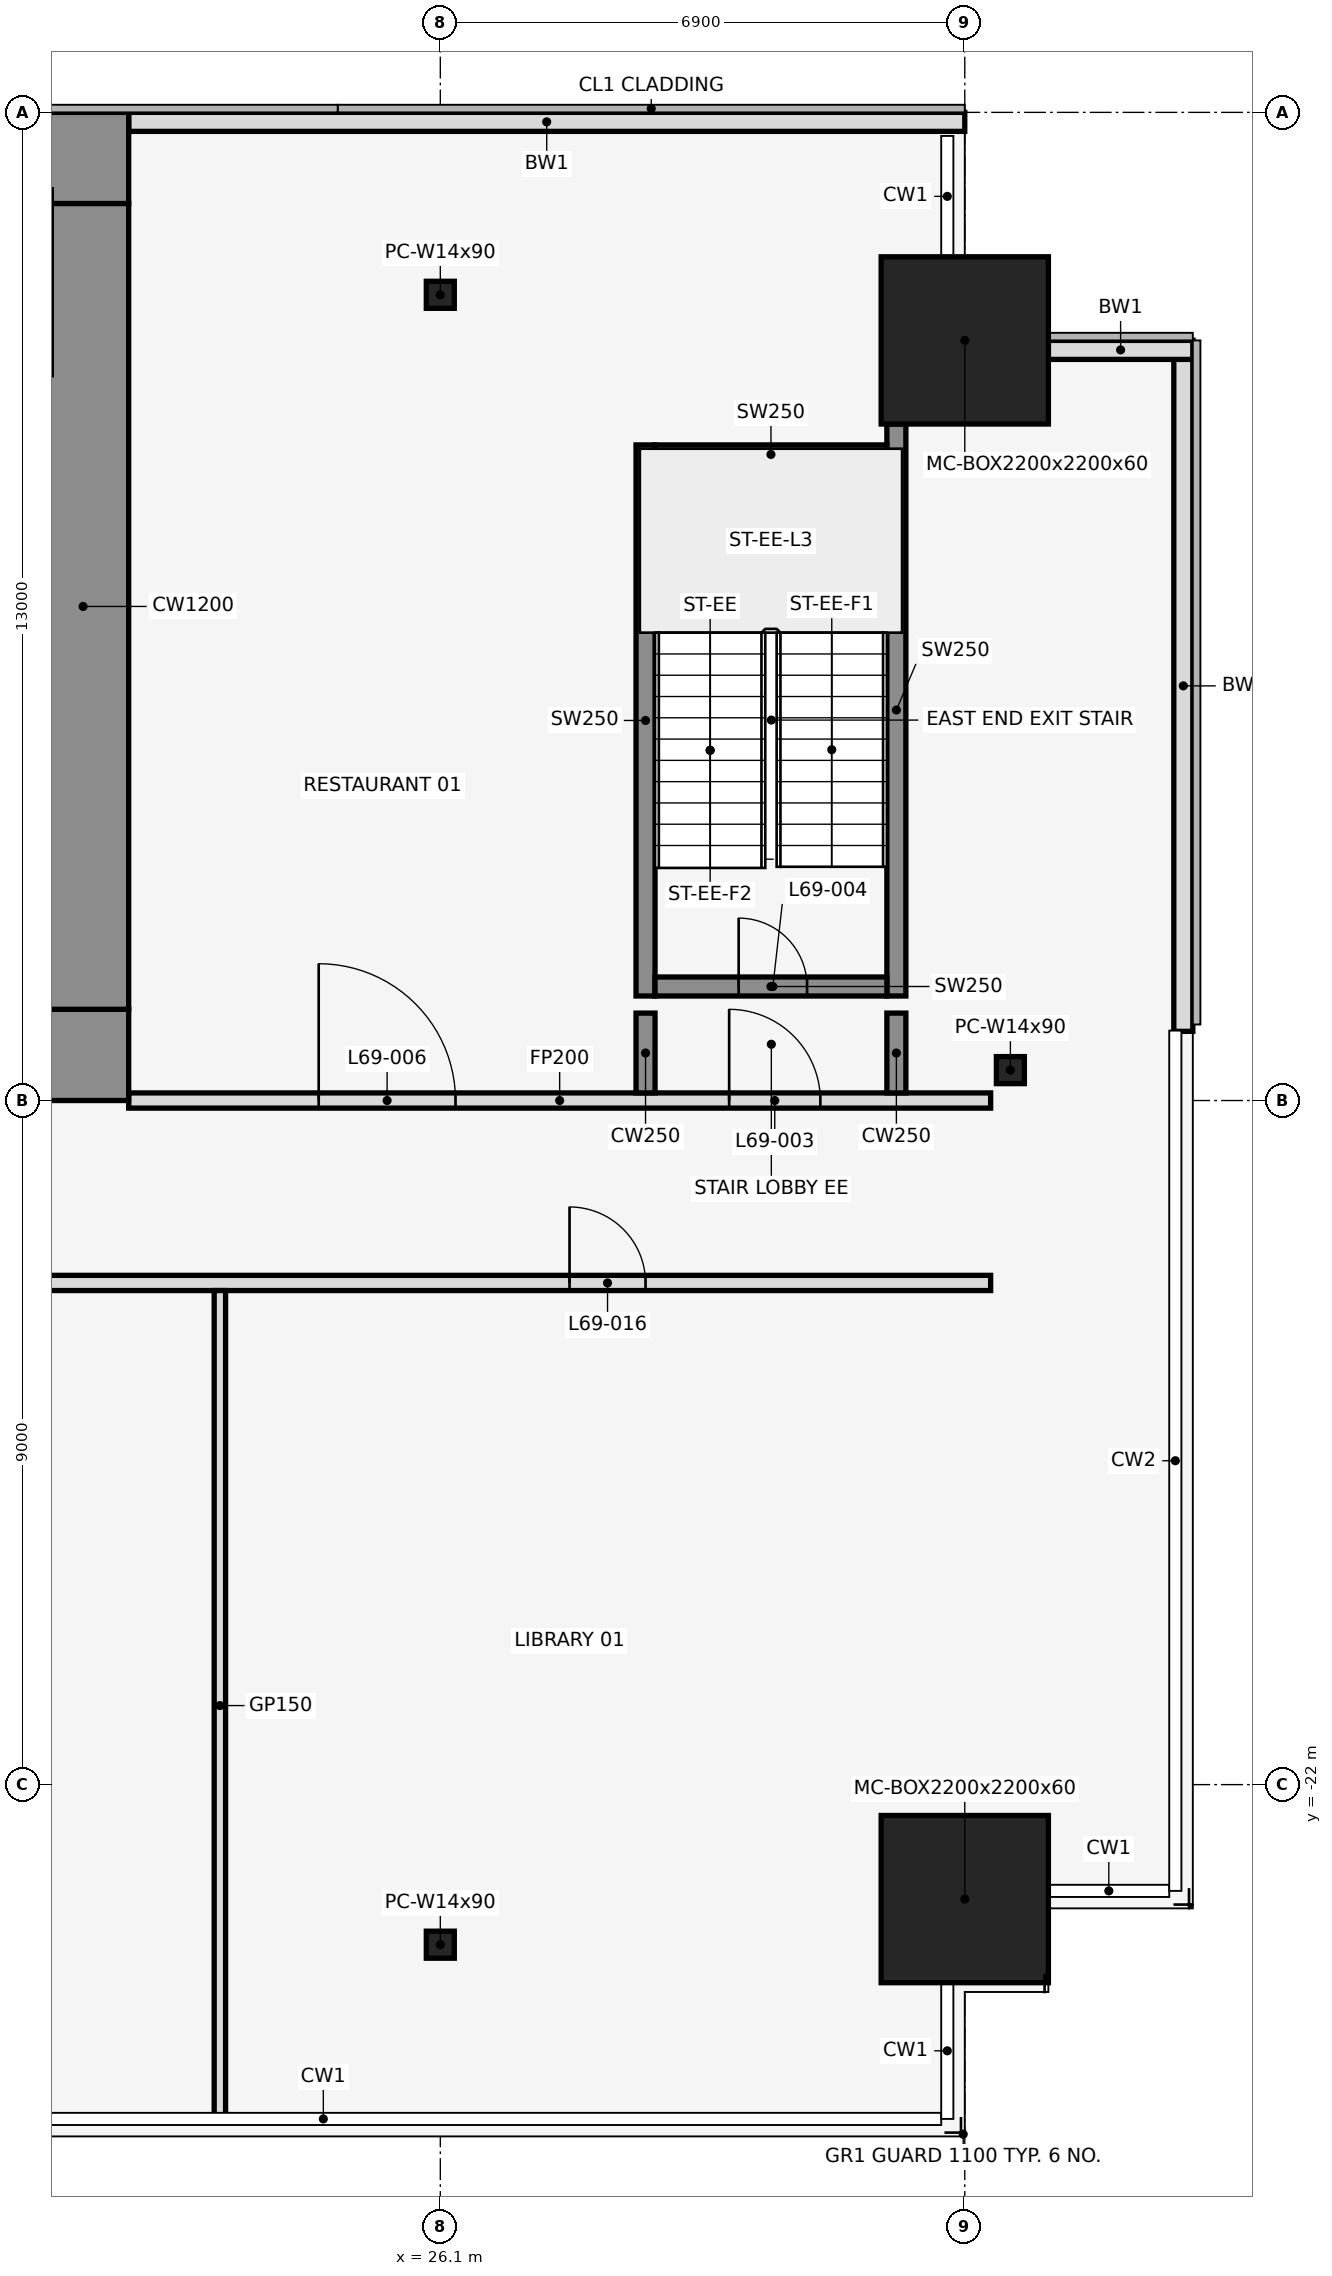
"""IFC4 building model, lengths in metres.
Left out: names, types, materials, properties, quantities, classifications, styles, units other than length and angle.
Written with IfcOpenShell. Run it as: python <this file> out.ifc"""

import sys

from ifc_helpers import new_model, si_unit, direction, frame, frame_2d, origin, origin_2d, place, context, subcontext, project, spatial, rectangle, hollow_rectangle, i_section, extrude, element, fill, save


model = new_model("IFC4")
c1 = context("Model", 3, precision=1e-05, world=origin(), true_north=direction((0.0, 1.0)))
c2 = subcontext(c1, "Body", "Model", "MODEL_VIEW")
j1 = project(units=[si_unit("LENGTHUNIT", "METRE"), si_unit("PLANEANGLEUNIT", "RADIAN")], contexts=[c1])
p1 = place(None, origin())
s1 = spatial("IfcSite", under=j1, at=p1, CompositionType="ELEMENT")
p2 = place(p1, origin())
s2 = spatial("IfcBuilding", under=s1, at=p2, CompositionType="ELEMENT")
p3 = place(p2, frame((0.0, 0.0, 306.5)))
s3 = spatial("IfcBuildingStorey", under=s2, at=p3, CompositionType="ELEMENT", Elevation=306.5)
for number, where, z_axis, x_axis in (
    (1, (26.1, -24.106, 0.0), (0.0, 0.0, 1.0), (1.0, 0.0, 0.0)),
    (2, (26.1, -2.4, 0.0), (0.0, 0.0, 1.0), (1.0, 0.0, 0.0)),
):
    element("IfcColumn", number, at=place(p3, frame(where, z_axis=z_axis, x_axis=x_axis)), inside=s3, PredefinedType="COLUMN", context=c2, shape_type="SweptSolid", body=[
        extrude(i_section(OverallWidth=0.368, OverallDepth=0.356, WebThickness=0.011, FlangeThickness=0.018, at=origin_2d()), origin(), (0.0, 0.0, 1.0), 4.5),
    ])
for number, where, z_axis, x_axis in (
    (3, (33.0, -23.506, 0.0), (0.0, 0.0, 1.0), (1.0, 0.0, 0.0)),
    (4, (33.0, -3.0, 0.0), (0.0, 0.0, 1.0), (1.0, 0.0, 0.0)),
):
    element("IfcColumn", number, at=place(p3, frame(where, z_axis=z_axis, x_axis=x_axis)), inside=s3, PredefinedType="COLUMN", context=c2, shape_type="SweptSolid", body=[
        extrude(hollow_rectangle(XDim=2.2, YDim=2.2, WallThickness=0.06, at=origin_2d()), origin(), (0.0, 0.0, 1.0), 4.5),
    ])
p4 = place(p3, frame((33.6, -12.6, 0.0), z_axis=(0.0, 0.0, 1.0), x_axis=(1.0, 0.0, 0.0)))
e5 = element("IfcColumn", 5, at=p4, inside=s3, PredefinedType="COLUMN", context=c2, shape_type="SweptSolid", body=[
    extrude(i_section(OverallWidth=0.368, OverallDepth=0.356, WebThickness=0.011, FlangeThickness=0.018, at=origin_2d()), origin(), (0.0, 0.0, 1.0), 4.5),
])
p5 = place(p3, frame((33.0, -0.125, 0.0), z_axis=(0.0, 0.0, 1.0), x_axis=(-1.0, 0.0, 0.0)))
e6 = element("IfcWall", 6, at=p5, inside=s3, PredefinedType="STANDARD", context=c2, shape_type="SweptSolid", body=[
    extrude(rectangle(XDim=11.0, YDim=0.25, at=frame_2d((5.5, 0.0))), origin(), (0.0, 0.0, 1.0), 4.35),
])
p6 = place(p3, frame((35.875, -12.09, 0.0), z_axis=(0.0, 0.0, 1.0), x_axis=(0.0, 1.0, 0.0)))
e7 = element("IfcWall", 7, at=p6, inside=s3, PredefinedType="STANDARD", context=c2, shape_type="SweptSolid", body=[
    extrude(rectangle(XDim=9.09, YDim=0.25, at=frame_2d((4.545, 0.0))), origin(), (0.0, 0.0, 1.0), 4.35),
])
p7 = place(p3, frame((36.0, -3.125, 0.0), z_axis=(0.0, 0.0, 1.0), x_axis=(-1.0, 0.0, 0.0)))
e8 = element("IfcWall", 8, at=p7, inside=s3, PredefinedType="STANDARD", context=c2, shape_type="SweptSolid", body=[
    extrude(rectangle(XDim=1.9, YDim=0.25, at=frame_2d((0.95, 0.0))), origin(), (0.0, 0.0, 1.0), 4.35),
])
p8 = place(p3, frame((28.8, -11.625, 0.0), z_axis=(0.0, 0.0, 1.0), x_axis=(0.0, 1.0, 0.0)))
e9 = element("IfcWall", 9, at=p8, inside=s3, PredefinedType="SHEAR", context=c2, shape_type="SweptSolid", body=[
    extrude(rectangle(XDim=7.25, YDim=0.25, at=frame_2d((3.625, 0.0))), origin(), (0.0, 0.0, 1.0), 4.5),
])
p9 = place(p3, frame((32.1, -11.625, 0.0), z_axis=(0.0, 0.0, 1.0), x_axis=(0.0, 1.0, 0.0)))
e10 = element("IfcWall", 10, at=p9, inside=s3, PredefinedType="SHEAR", context=c2, shape_type="SweptSolid", body=[
    extrude(rectangle(XDim=7.525, YDim=0.25, at=frame_2d((3.762, 0.0))), origin(), (0.0, 0.0, 1.0), 4.5),
])
p10 = place(p3, frame((28.925, -11.5, 0.0), z_axis=(0.0, 0.0, 1.0), x_axis=(1.0, 0.0, 0.0)))
e11 = element("IfcWall", 11, at=p10, inside=s3, PredefinedType="SHEAR", context=c2, shape_type="SweptSolid", body=[
    extrude(rectangle(XDim=3.05, YDim=0.25, at=frame_2d((1.525, 0.0))), origin(), (0.0, 0.0, 1.0), 4.5),
])
p11 = place(p10, frame((1.1, 0.0, 0.0)))
e12 = element("IfcOpeningElement", 12, at=p11, cuts=e11, PredefinedType="OPENING", context=c2, shape_type="SweptSolid", body=[
    extrude(rectangle(XDim=0.9, YDim=2.1, at=frame_2d((0.45, 1.05))), frame((0.0, 0.137, 0.0), z_axis=(0.0, -1.0, 0.0), x_axis=(1.0, 0.0, 0.0)), (0.0, 0.0, 1.0), 0.274),
])
p12 = place(p3, frame((28.925, -4.5, 0.0), z_axis=(0.0, 0.0, 1.0), x_axis=(1.0, 0.0, 0.0)))
e13 = element("IfcWall", 13, at=p12, inside=s3, PredefinedType="SHEAR", context=c2, shape_type="SweptSolid", body=[
    extrude(rectangle(XDim=3.05, YDim=0.25, at=frame_2d((1.525, 0.0))), origin(), (0.0, 0.0, 1.0), 4.5),
])
p13 = place(p3, frame((1.4, -15.4, 0.0), z_axis=(0.0, 0.0, 1.0), x_axis=(1.0, 0.0, 0.0)))
e14 = element("IfcWall", 14, at=p13, inside=s3, PredefinedType="PARTITIONING", context=c2, shape_type="SweptSolid", body=[
    extrude(rectangle(XDim=31.94, YDim=0.2, at=frame_2d((15.97, 0.0))), origin(), (0.0, 0.0, 1.0), 3.418),
])
p14 = place(p13, frame((4.2, 0.0, 0.0)))
e15 = element("IfcOpeningElement", 15, at=p14, cuts=e14, PredefinedType="OPENING", context=c2, shape_type="SweptSolid", body=[
    extrude(rectangle(XDim=1.8, YDim=2.1, at=frame_2d((0.9, 1.05))), frame((0.0, 0.112, 0.0), z_axis=(0.0, -1.0, 0.0), x_axis=(1.0, 0.0, 0.0)), (0.0, 0.0, 1.0), 0.224),
])
p15 = place(p13, frame((15.5, 0.0, 0.0)))
e16 = element("IfcOpeningElement", 16, at=p15, cuts=e14, PredefinedType="OPENING", context=c2, shape_type="SweptSolid", body=[
    extrude(rectangle(XDim=1.0, YDim=2.1, at=frame_2d((0.5, 1.05))), frame((0.0, 0.112, 0.0), z_axis=(0.0, -1.0, 0.0), x_axis=(1.0, 0.0, 0.0)), (0.0, 0.0, 1.0), 0.224),
])
p16 = place(p13, frame((26.4, 0.0, 0.0)))
e17 = element("IfcOpeningElement", 17, at=p16, cuts=e14, PredefinedType="OPENING", context=c2, shape_type="SweptSolid", body=[
    extrude(rectangle(XDim=1.0, YDim=2.1, at=frame_2d((0.5, 1.05))), frame((0.0, 0.112, 0.0), z_axis=(0.0, -1.0, 0.0), x_axis=(1.0, 0.0, 0.0)), (0.0, 0.0, 1.0), 0.224),
])
p17 = place(p3, frame((22.0, -13.0, 0.0), z_axis=(0.0, 0.0, 1.0), x_axis=(1.0, 0.0, 0.0)))
e18 = element("IfcWall", 18, at=p17, inside=s3, PredefinedType="PARTITIONING", context=c2, shape_type="SweptSolid", body=[
    extrude(rectangle(XDim=11.34, YDim=0.2, at=frame_2d((5.67, 0.0))), origin(), (0.0, 0.0, 1.0), 3.418),
])
p18 = place(p17, frame((7.9, 0.0, 0.0)))
e19 = element("IfcOpeningElement", 19, at=p18, cuts=e18, PredefinedType="OPENING", context=c2, shape_type="SweptSolid", body=[
    extrude(rectangle(XDim=1.2, YDim=2.1, at=frame_2d((0.6, 1.05))), frame((0.0, 0.112, 0.0), z_axis=(0.0, -1.0, 0.0), x_axis=(1.0, 0.0, 0.0)), (0.0, 0.0, 1.0), 0.224),
])
p19 = place(p17, frame((2.5, 0.0, 0.0)))
e20 = element("IfcOpeningElement", 20, at=p19, cuts=e18, PredefinedType="OPENING", context=c2, shape_type="SweptSolid", body=[
    extrude(rectangle(XDim=1.8, YDim=2.1, at=frame_2d((0.9, 1.05))), frame((0.0, 0.112, 0.0), z_axis=(0.0, -1.0, 0.0), x_axis=(1.0, 0.0, 0.0)), (0.0, 0.0, 1.0), 0.224),
])
p20 = place(p3, frame((23.2, -26.42, 0.0), z_axis=(0.0, 0.0, 1.0), x_axis=(0.0, 1.0, 0.0)))
e21 = element("IfcWall", 21, at=p20, inside=s3, PredefinedType="PARTITIONING", context=c2, shape_type="SweptSolid", body=[
    extrude(rectangle(XDim=10.92, YDim=0.15, at=frame_2d((5.46, 0.0))), origin(), (0.0, 0.0, 1.0), 3.418),
])
for number, where, z_axis, x_axis in (
    (22, (28.8, -12.9, 0.0), (0.0, 0.0, 1.0), (0.0, 1.0, 0.0)),
    (23, (32.1, -12.9, 0.0), (0.0, 0.0, 1.0), (0.0, 1.0, 0.0)),
):
    element("IfcWall", number, at=place(p3, frame(where, z_axis=z_axis, x_axis=x_axis)), inside=s3, PredefinedType="SHEAR", context=c2, shape_type="SweptSolid", body=[
        extrude(rectangle(XDim=1.05, YDim=0.25, at=frame_2d((0.525, 0.0))), origin(), (0.0, 0.0, 1.0), 4.5),
    ])
p21 = place(p3, frame((-22.0, -0.6, 0.0), z_axis=(0.0, 0.0, 1.0), x_axis=(1.0, 0.0, 0.0)))
e24 = element("IfcWall", 24, at=p21, inside=s3, PredefinedType="SHEAR", context=c2, shape_type="SweptSolid", body=[
    extrude(rectangle(XDim=44.0, YDim=1.2, at=frame_2d((22.0, 0.0))), origin(), (0.0, 0.0, 1.0), 4.5),
])
p22 = place(p21, frame((18.55, 0.0, 0.0)))
e25 = element("IfcOpeningElement", 25, at=p22, cuts=e24, PredefinedType="OPENING", context=c2, shape_type="SweptSolid", body=[
    extrude(rectangle(XDim=0.9, YDim=2.1, at=frame_2d((0.45, 1.05))), frame((0.0, 0.612, 0.0), z_axis=(0.0, -1.0, 0.0), x_axis=(1.0, 0.0, 0.0)), (0.0, 0.0, 1.0), 1.224),
])
p23 = place(p21, frame((24.55, 0.0, 0.0)))
e26 = element("IfcOpeningElement", 26, at=p23, cuts=e24, PredefinedType="OPENING", context=c2, shape_type="SweptSolid", body=[
    extrude(rectangle(XDim=0.9, YDim=2.1, at=frame_2d((0.45, 1.05))), frame((0.0, 0.612, 0.0), z_axis=(0.0, -1.0, 0.0), x_axis=(1.0, 0.0, 0.0)), (0.0, 0.0, 1.0), 1.224),
])
p24 = place(p3, frame((-22.0, -12.4, 0.0), z_axis=(0.0, 0.0, 1.0), x_axis=(1.0, 0.0, 0.0)))
e27 = element("IfcWall", 27, at=p24, inside=s3, PredefinedType="SHEAR", context=c2, shape_type="SweptSolid", body=[
    extrude(rectangle(XDim=44.0, YDim=1.2, at=frame_2d((22.0, 0.0))), origin(), (0.0, 0.0, 1.0), 4.5),
])
p25 = place(p24, frame((2.2, 0.0, 0.0)))
e28 = element("IfcOpeningElement", 28, at=p25, cuts=e27, PredefinedType="OPENING", context=c2, shape_type="SweptSolid", body=[
    extrude(rectangle(XDim=1.2, YDim=2.1, at=frame_2d((0.6, 1.05))), frame((0.0, 0.612, 0.0), z_axis=(0.0, -1.0, 0.0), x_axis=(1.0, 0.0, 0.0)), (0.0, 0.0, 1.0), 1.224),
])
p26 = place(p24, frame((21.4, 0.0, 0.0)))
e29 = element("IfcOpeningElement", 29, at=p26, cuts=e27, PredefinedType="OPENING", context=c2, shape_type="SweptSolid", body=[
    extrude(rectangle(XDim=1.2, YDim=2.1, at=frame_2d((0.6, 1.05))), frame((0.0, 0.612, 0.0), z_axis=(0.0, -1.0, 0.0), x_axis=(1.0, 0.0, 0.0)), (0.0, 0.0, 1.0), 1.224),
])
p27 = place(p24, frame((40.6, 0.0, 0.0)))
e30 = element("IfcOpeningElement", 30, at=p27, cuts=e27, PredefinedType="OPENING", context=c2, shape_type="SweptSolid", body=[
    extrude(rectangle(XDim=1.2, YDim=2.1, at=frame_2d((0.6, 1.05))), frame((0.0, 0.612, 0.0), z_axis=(0.0, -1.0, 0.0), x_axis=(1.0, 0.0, 0.0)), (0.0, 0.0, 1.0), 1.224),
])
p28 = place(p24, frame((16.0, 0.0, 0.0)))
e31 = element("IfcOpeningElement", 31, at=p28, cuts=e27, PredefinedType="OPENING", context=c2, shape_type="SweptSolid", body=[
    extrude(rectangle(XDim=1.8, YDim=2.1, at=frame_2d((0.9, 1.05))), frame((0.0, 0.612, 0.0), z_axis=(0.0, -1.0, 0.0), x_axis=(1.0, 0.0, 0.0)), (0.0, 0.0, 1.0), 1.224),
])
p29 = place(p24, frame((6.3, 0.0, 0.0)))
e32 = element("IfcOpeningElement", 32, at=p29, cuts=e27, PredefinedType="OPENING", context=c2, shape_type="SweptSolid", body=[
    extrude(rectangle(XDim=1.2, YDim=2.1, at=frame_2d((0.6, 1.05))), frame((0.0, 0.612, 0.0), z_axis=(0.0, -1.0, 0.0), x_axis=(1.0, 0.0, 0.0)), (0.0, 0.0, 1.0), 1.224),
])
p30 = place(p24, frame((26.2, 0.0, 0.0)))
e33 = element("IfcOpeningElement", 33, at=p30, cuts=e27, PredefinedType="OPENING", context=c2, shape_type="SweptSolid", body=[
    extrude(rectangle(XDim=1.8, YDim=2.1, at=frame_2d((0.9, 1.05))), frame((0.0, 0.612, 0.0), z_axis=(0.0, -1.0, 0.0), x_axis=(1.0, 0.0, 0.0)), (0.0, 0.0, 1.0), 1.224),
])
p31 = place(p24, frame((36.5, 0.0, 0.0)))
e34 = element("IfcOpeningElement", 34, at=p31, cuts=e27, PredefinedType="OPENING", context=c2, shape_type="SweptSolid", body=[
    extrude(rectangle(XDim=1.2, YDim=2.1, at=frame_2d((0.6, 1.05))), frame((0.0, 0.612, 0.0), z_axis=(0.0, -1.0, 0.0), x_axis=(1.0, 0.0, 0.0)), (0.0, 0.0, 1.0), 1.224),
])
p32 = place(p3, frame((21.4, -11.8, 0.0), z_axis=(0.0, 0.0, 1.0), x_axis=(0.0, 1.0, 0.0)))
e35 = element("IfcWall", 35, at=p32, inside=s3, PredefinedType="SHEAR", context=c2, shape_type="SweptSolid", body=[
    extrude(rectangle(XDim=10.6, YDim=1.2, at=frame_2d((5.3, 0.0))), origin(), (0.0, 0.0, 1.0), 4.5),
])
p33 = place(p18, origin())
e36 = element("IfcDoor", 36, at=p33, inside=s3, OperationType="SINGLE_SWING_RIGHT", PredefinedType="DOOR", context=c2, shape_type="SweptSolid", body=[
    extrude(rectangle(XDim=1.2, YDim=2.1, at=frame_2d((0.6, 1.05))), frame((0.0, 0.025, 0.0), z_axis=(0.0, -1.0, 0.0), x_axis=(1.0, 0.0, 0.0)), (0.0, 0.0, 1.0), 0.05),
])
fill(e19, e36)
p34 = place(p11, origin())
e37 = element("IfcDoor", 37, at=p34, inside=s3, OperationType="SINGLE_SWING_LEFT", PredefinedType="DOOR", context=c2, shape_type="SweptSolid", body=[
    extrude(rectangle(XDim=0.9, YDim=2.1, at=frame_2d((0.45, 1.05))), frame((0.0, 0.025, 0.0), z_axis=(0.0, -1.0, 0.0), x_axis=(1.0, 0.0, 0.0)), (0.0, 0.0, 1.0), 0.05),
])
fill(e12, e37)
p35 = place(p19, origin())
e38 = element("IfcDoor", 38, at=p35, inside=s3, OperationType="SINGLE_SWING_LEFT", PredefinedType="DOOR", context=c2, shape_type="SweptSolid", body=[
    extrude(rectangle(XDim=1.8, YDim=2.1, at=frame_2d((0.9, 1.05))), frame((0.0, 0.025, 0.0), z_axis=(0.0, -1.0, 0.0), x_axis=(1.0, 0.0, 0.0)), (0.0, 0.0, 1.0), 0.05),
])
fill(e20, e38)
p36 = place(p16, frame((1.0, 0.0, 0.0), z_axis=(0.0, 0.0, 1.0), x_axis=(-1.0, 0.0, 0.0)))
e39 = element("IfcDoor", 39, at=p36, inside=s3, OperationType="SINGLE_SWING_LEFT", PredefinedType="DOOR", context=c2, shape_type="SweptSolid", body=[
    extrude(rectangle(XDim=1.0, YDim=2.1, at=frame_2d((0.5, 1.05))), frame((0.0, 0.025, 0.0), z_axis=(0.0, -1.0, 0.0), x_axis=(1.0, 0.0, 0.0)), (0.0, 0.0, 1.0), 0.05),
])
fill(e17, e39)
save(model, sys.argv[1])
